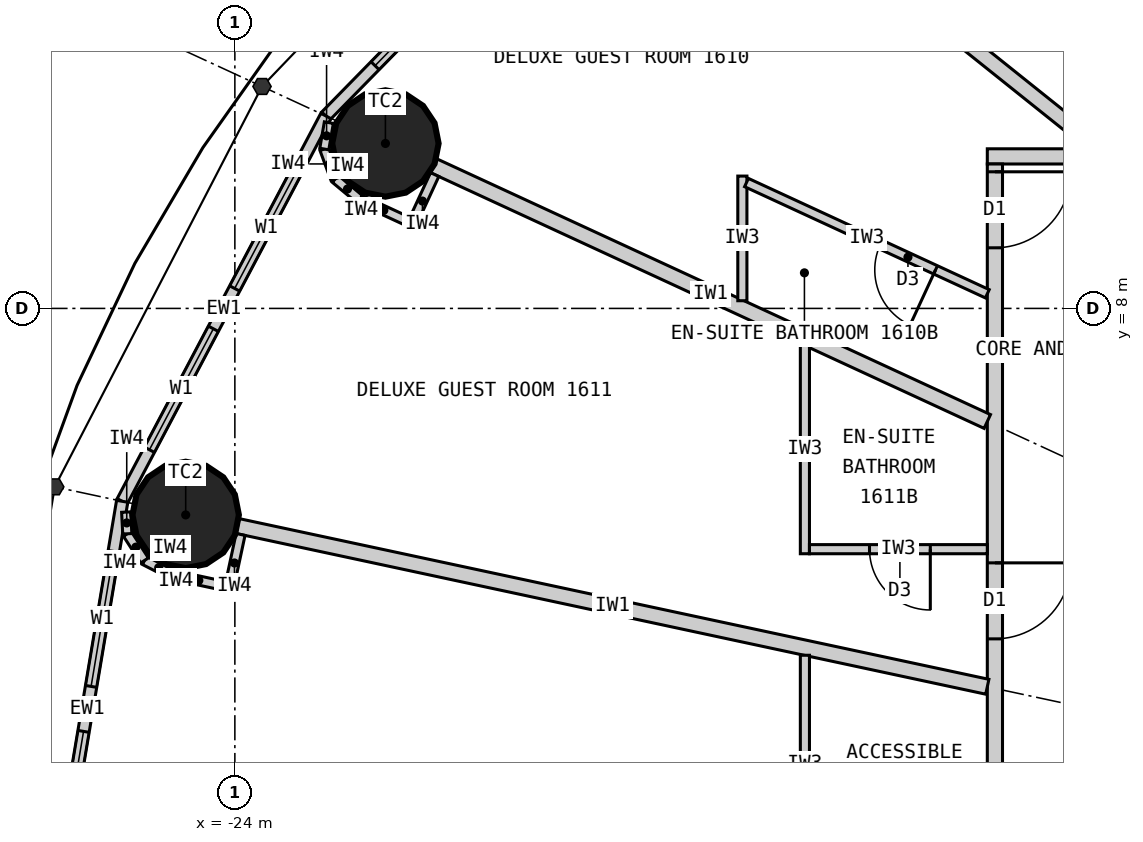
"""IFC4 building model, lengths in metres.
Left out: names, types, materials, properties, quantities, classifications, styles, units other than length and angle.
Written with IfcOpenShell. Run it as: python <this file> out.ifc"""

import sys

from ifc_helpers import new_model, si_unit, direction, frame, frame_2d, origin, origin_2d, place, context, subcontext, project, spatial, rectangle, circle, extrude, element, fill, save


model = new_model("IFC4")
c1 = context("Model", 3, precision=1e-05, world=origin(), true_north=direction((0.0, 1.0)))
c2 = subcontext(c1, "Body", "Model", "MODEL_VIEW")
j1 = project(units=[si_unit("LENGTHUNIT", "METRE"), si_unit("PLANEANGLEUNIT", "RADIAN")], contexts=[c1])
p1 = place(None, origin())
s1 = spatial("IfcSite", under=j1, at=p1, CompositionType="ELEMENT")
p2 = place(p1, origin())
s2 = spatial("IfcBuilding", under=s1, at=p2, CompositionType="ELEMENT")
p3 = place(p2, frame((0.0, 0.0, 67.2)))
s3 = spatial("IfcBuildingStorey", under=s2, at=p3, CompositionType="ELEMENT", Elevation=67.2)
for number, where, z_axis, x_axis in (
    (1, (-22.019, 10.17, 0.0), (0.0, 0.0, 1.0), (1.0, 0.0, 0.0)),
    (2, (-24.647, 5.283, 0.0), (0.0, 0.0, 1.0), (1.0, 0.0, 0.0)),
):
    element("IfcColumn", number, at=place(p3, frame(where, z_axis=z_axis, x_axis=x_axis)), inside=s3, PredefinedType="COLUMN", context=c2, shape_type="SweptSolid", body=[
        extrude(circle(Radius=0.7, at=origin_2d()), origin(), (0.0, 0.0, 1.0), 3.3),
    ])
p4 = place(p3, frame((-18.57, 14.856, 0.0), z_axis=(0.0, 0.0, 1.0), x_axis=(-0.699602905915, -0.714531856557, 0.0)))
e3 = element("IfcWall", 3, at=p4, inside=s3, PredefinedType="ELEMENTEDWALL", context=c2, shape_type="SweptSolid", body=[
    extrude(rectangle(XDim=6.051, YDim=0.15, at=frame_2d((3.025, 0.0))), origin(), (0.0, 0.0, 1.0), 3.12),
])
p5 = place(p4, frame((0.926, 0.0, 0.9)))
e4 = element("IfcOpeningElement", 4, at=p5, cuts=e3, PredefinedType="OPENING", context=c2, shape_type="SweptSolid", body=[
    extrude(rectangle(XDim=1.8, YDim=1.9, at=frame_2d((0.9, 0.95))), frame((0.0, 0.085, 0.0), z_axis=(0.0, -1.0, 0.0), x_axis=(1.0, 0.0, 0.0)), (0.0, 0.0, 1.0), 0.17),
])
p6 = place(p4, frame((3.325, 0.0, 0.9)))
e5 = element("IfcOpeningElement", 5, at=p6, cuts=e3, PredefinedType="OPENING", context=c2, shape_type="SweptSolid", body=[
    extrude(rectangle(XDim=1.8, YDim=1.9, at=frame_2d((0.9, 0.95))), frame((0.0, 0.085, 0.0), z_axis=(0.0, -1.0, 0.0), x_axis=(1.0, 0.0, 0.0)), (0.0, 0.0, 1.0), 0.17),
])
p7 = place(p3, frame((-22.803, 10.532, 0.0), z_axis=(0.0, 0.0, 1.0), x_axis=(-0.467296867008, -0.884100468321, 0.0)))
e6 = element("IfcWall", 6, at=p7, inside=s3, PredefinedType="ELEMENTEDWALL", context=c2, shape_type="SweptSolid", body=[
    extrude(rectangle(XDim=5.734, YDim=0.15, at=frame_2d((2.867, 0.0))), origin(), (0.0, 0.0, 1.0), 3.12),
])
p8 = place(p7, frame((0.767, 0.0, 0.9)))
e7 = element("IfcOpeningElement", 7, at=p8, cuts=e6, PredefinedType="OPENING", context=c2, shape_type="SweptSolid", body=[
    extrude(rectangle(XDim=1.8, YDim=1.9, at=frame_2d((0.9, 0.95))), frame((0.0, 0.085, 0.0), z_axis=(0.0, -1.0, 0.0), x_axis=(1.0, 0.0, 0.0)), (0.0, 0.0, 1.0), 0.17),
])
p9 = place(p7, frame((3.167, 0.0, 0.9)))
e8 = element("IfcOpeningElement", 8, at=p9, cuts=e6, PredefinedType="OPENING", context=c2, shape_type="SweptSolid", body=[
    extrude(rectangle(XDim=1.8, YDim=1.9, at=frame_2d((0.9, 0.95))), frame((0.0, 0.085, 0.0), z_axis=(0.0, -1.0, 0.0), x_axis=(1.0, 0.0, 0.0)), (0.0, 0.0, 1.0), 0.17),
])
p10 = place(p3, frame((-25.482, 5.462, 0.0), z_axis=(0.0, 0.0, 1.0), x_axis=(-0.165642551694, -0.986185857264, 0.0)))
e9 = element("IfcWall", 9, at=p10, inside=s3, PredefinedType="ELEMENTEDWALL", context=c2, shape_type="SweptSolid", body=[
    extrude(rectangle(XDim=5.539, YDim=0.15, at=frame_2d((2.77, 0.0))), origin(), (0.0, 0.0, 1.0), 3.12),
])
p11 = place(p10, frame((0.669, 0.0, 0.9)))
e10 = element("IfcOpeningElement", 10, at=p11, cuts=e9, PredefinedType="OPENING", context=c2, shape_type="SweptSolid", body=[
    extrude(rectangle(XDim=1.8, YDim=1.9, at=frame_2d((0.9, 0.95))), frame((0.0, 0.085, 0.0), z_axis=(0.0, -1.0, 0.0), x_axis=(1.0, 0.0, 0.0)), (0.0, 0.0, 1.0), 0.17),
])
p12 = place(p10, frame((3.07, 0.0, 0.9)))
e11 = element("IfcOpeningElement", 11, at=p12, cuts=e9, PredefinedType="OPENING", context=c2, shape_type="SweptSolid", body=[
    extrude(rectangle(XDim=1.8, YDim=1.9, at=frame_2d((0.9, 0.95))), frame((0.0, 0.085, 0.0), z_axis=(0.0, -1.0, 0.0), x_axis=(1.0, 0.0, 0.0)), (0.0, 0.0, 1.0), 0.17),
])
p13 = place(p3, frame((-14.1, 10.0, 0.0), z_axis=(0.0, 0.0, 1.0), x_axis=(1.0, 0.0, 0.0)))
e12 = element("IfcWall", 12, at=p13, inside=s3, PredefinedType="PARTITIONING", context=c2, shape_type="SweptSolid", body=[
    extrude(rectangle(XDim=28.2, YDim=0.2, at=frame_2d((14.1, 0.0))), origin(), (0.0, 0.0, 1.0), 3.12),
])
p14 = place(p13, frame((18.529, 0.0, 0.0)))
e13 = element("IfcOpeningElement", 13, at=p14, cuts=e12, PredefinedType="OPENING", context=c2, shape_type="SweptSolid", body=[
    extrude(rectangle(XDim=1.0, YDim=2.2, at=frame_2d((0.5, 1.1))), frame((0.0, 0.11, 0.0), z_axis=(0.0, -1.0, 0.0), x_axis=(1.0, 0.0, 0.0)), (0.0, 0.0, 1.0), 0.22),
])
p15 = place(p13, frame((14.623, 0.0, 0.0)))
e14 = element("IfcOpeningElement", 14, at=p15, cuts=e12, PredefinedType="OPENING", context=c2, shape_type="SweptSolid", body=[
    extrude(rectangle(XDim=1.0, YDim=2.2, at=frame_2d((0.5, 1.1))), frame((0.0, 0.11, 0.0), z_axis=(0.0, -1.0, 0.0), x_axis=(1.0, 0.0, 0.0)), (0.0, 0.0, 1.0), 0.22),
])
p16 = place(p13, frame((11.24, 0.0, 0.0)))
e15 = element("IfcOpeningElement", 15, at=p16, cuts=e12, PredefinedType="OPENING", context=c2, shape_type="SweptSolid", body=[
    extrude(rectangle(XDim=1.0, YDim=2.2, at=frame_2d((0.5, 1.1))), frame((0.0, 0.11, 0.0), z_axis=(0.0, -1.0, 0.0), x_axis=(1.0, 0.0, 0.0)), (0.0, 0.0, 1.0), 0.22),
])
p17 = place(p13, frame((8.671, 0.0, 0.0)))
e16 = element("IfcOpeningElement", 16, at=p17, cuts=e12, PredefinedType="OPENING", context=c2, shape_type="SweptSolid", body=[
    extrude(rectangle(XDim=1.0, YDim=2.2, at=frame_2d((0.5, 1.1))), frame((0.0, 0.11, 0.0), z_axis=(0.0, -1.0, 0.0), x_axis=(1.0, 0.0, 0.0)), (0.0, 0.0, 1.0), 0.22),
])
p18 = place(p13, frame((2.801, 0.0, 0.0)))
e17 = element("IfcOpeningElement", 17, at=p18, cuts=e12, PredefinedType="OPENING", context=c2, shape_type="SweptSolid", body=[
    extrude(rectangle(XDim=1.0, YDim=2.2, at=frame_2d((0.5, 1.1))), frame((0.0, 0.11, 0.0), z_axis=(0.0, -1.0, 0.0), x_axis=(1.0, 0.0, 0.0)), (0.0, 0.0, 1.0), 0.22),
])
p19 = place(p3, frame((-14.0, 9.9, 0.0), z_axis=(0.0, 0.0, 1.0), x_axis=(0.0, -1.0, 0.0)))
e18 = element("IfcWall", 18, at=p19, inside=s3, PredefinedType="PARTITIONING", context=c2, shape_type="SweptSolid", body=[
    extrude(rectangle(XDim=19.8, YDim=0.2, at=frame_2d((9.9, 0.0))), origin(), (0.0, 0.0, 1.0), 3.12),
])
p20 = place(p19, frame((0.103, 0.0, 0.0)))
e19 = element("IfcOpeningElement", 19, at=p20, cuts=e18, PredefinedType="OPENING", context=c2, shape_type="SweptSolid", body=[
    extrude(rectangle(XDim=1.0, YDim=2.2, at=frame_2d((0.5, 1.1))), frame((0.0, 0.11, 0.0), z_axis=(0.0, -1.0, 0.0), x_axis=(1.0, 0.0, 0.0)), (0.0, 0.0, 1.0), 0.22),
])
p21 = place(p19, frame((5.248, 0.0, 0.0)))
e20 = element("IfcOpeningElement", 20, at=p21, cuts=e18, PredefinedType="OPENING", context=c2, shape_type="SweptSolid", body=[
    extrude(rectangle(XDim=1.0, YDim=2.2, at=frame_2d((0.5, 1.1))), frame((0.0, 0.11, 0.0), z_axis=(0.0, -1.0, 0.0), x_axis=(1.0, 0.0, 0.0)), (0.0, 0.0, 1.0), 0.22),
])
p22 = place(p19, frame((9.438, 0.0, 0.0)))
e21 = element("IfcOpeningElement", 21, at=p22, cuts=e18, PredefinedType="OPENING", context=c2, shape_type="SweptSolid", body=[
    extrude(rectangle(XDim=1.0, YDim=2.2, at=frame_2d((0.5, 1.1))), frame((0.0, 0.11, 0.0), z_axis=(0.0, -1.0, 0.0), x_axis=(1.0, 0.0, 0.0)), (0.0, 0.0, 1.0), 0.22),
])
p23 = place(p19, frame((13.942, 0.0, 0.0)))
e22 = element("IfcOpeningElement", 22, at=p23, cuts=e18, PredefinedType="OPENING", context=c2, shape_type="SweptSolid", body=[
    extrude(rectangle(XDim=1.0, YDim=2.2, at=frame_2d((0.5, 1.1))), frame((0.0, 0.11, 0.0), z_axis=(0.0, -1.0, 0.0), x_axis=(1.0, 0.0, 0.0)), (0.0, 0.0, 1.0), 0.22),
])
p24 = place(p19, frame((18.698, 0.0, 0.0)))
e23 = element("IfcOpeningElement", 23, at=p24, cuts=e18, PredefinedType="OPENING", context=c2, shape_type="SweptSolid", body=[
    extrude(rectangle(XDim=1.0, YDim=2.2, at=frame_2d((0.5, 1.1))), frame((0.0, 0.11, 0.0), z_axis=(0.0, -1.0, 0.0), x_axis=(1.0, 0.0, 0.0)), (0.0, 0.0, 1.0), 0.22),
])
p25 = place(p3, frame((-12.625, 10.1, 0.0), z_axis=(0.0, 0.0, 1.0), x_axis=(-0.780892451574, 0.624665493744, 0.0)))
e24 = element("IfcWall", 24, at=p25, inside=s3, PredefinedType="PARTITIONING", context=c2, shape_type="SweptSolid", body=[
    extrude(rectangle(XDim=6.045, YDim=0.2, at=frame_2d((3.022, 0.0))), origin(), (0.0, 0.0, 1.0), 2.32),
])
p26 = place(p3, frame((-14.1, 6.512, 0.0), z_axis=(0.0, 0.0, 1.0), x_axis=(-0.907832871056, 0.419332181247, 0.0)))
e25 = element("IfcWall", 25, at=p26, inside=s3, PredefinedType="PARTITIONING", context=c2, shape_type="SweptSolid", body=[
    extrude(rectangle(XDim=8.023, YDim=0.2, at=frame_2d((4.011, 0.0))), origin(), (0.0, 0.0, 1.0), 2.32),
])
p27 = place(p3, frame((-14.1, 3.022, 0.0), z_axis=(0.0, 0.0, 1.0), x_axis=(-0.977790014929, 0.209586943072, 0.0)))
e26 = element("IfcWall", 26, at=p27, inside=s3, PredefinedType="PARTITIONING", context=c2, shape_type="SweptSolid", body=[
    extrude(rectangle(XDim=10.087, YDim=0.2, at=frame_2d((5.043, 0.0))), origin(), (0.0, 0.0, 1.0), 2.32),
])
p28 = place(p3, frame((-17.323, 8.101, 0.0), z_axis=(0.0, 0.0, 1.0), x_axis=(0.0, 1.0, 0.0)))
e27 = element("IfcWall", 27, at=p28, inside=s3, PredefinedType="PARTITIONING", context=c2, shape_type="SweptSolid", body=[
    extrude(rectangle(XDim=1.64, YDim=0.12, at=frame_2d((0.82, 0.0))), origin(), (0.0, 0.0, 1.0), 3.12),
])
p29 = place(p3, frame((-14.1, 8.193, 0.0), z_axis=(0.0, 0.0, 1.0), x_axis=(-0.907836493557, 0.419324338628, 0.0)))
e28 = element("IfcWall", 28, at=p29, inside=s3, PredefinedType="PARTITIONING", context=c2, shape_type="SweptSolid", body=[
    extrude(rectangle(XDim=3.49, YDim=0.12, at=frame_2d((1.745, 0.0))), origin(), (0.0, 0.0, 1.0), 3.12),
])
p30 = place(p29, frame((0.75, 0.0, 0.0)))
e29 = element("IfcOpeningElement", 29, at=p30, cuts=e28, PredefinedType="OPENING", context=c2, shape_type="SweptSolid", body=[
    extrude(rectangle(XDim=0.8, YDim=2.1, at=frame_2d((0.4, 1.05))), frame((0.0, 0.07, 0.0), z_axis=(0.0, -1.0, 0.0), x_axis=(1.0, 0.0, 0.0)), (0.0, 0.0, 1.0), 0.14),
])
p31 = place(p3, frame((-16.5, 7.521, 0.0), z_axis=(0.0, 0.0, 1.0), x_axis=(0.0, -1.0, 0.0)))
e30 = element("IfcWall", 30, at=p31, inside=s3, PredefinedType="PARTITIONING", context=c2, shape_type="SweptSolid", body=[
    extrude(rectangle(XDim=2.749, YDim=0.12, at=frame_2d((1.374, 0.0))), origin(), (0.0, 0.0, 1.0), 3.12),
])
p32 = place(p3, frame((-14.1, 4.833, 0.0), z_axis=(0.0, 0.0, 1.0), x_axis=(-1.0, 0.0, 0.0)))
e31 = element("IfcWall", 31, at=p32, inside=s3, PredefinedType="PARTITIONING", context=c2, shape_type="SweptSolid", body=[
    extrude(rectangle(XDim=2.34, YDim=0.12, at=frame_2d((1.17, 0.0))), origin(), (0.0, 0.0, 1.0), 3.12),
])
p33 = place(p32, frame((0.75, 0.0, 0.0)))
e32 = element("IfcOpeningElement", 32, at=p33, cuts=e31, PredefinedType="OPENING", context=c2, shape_type="SweptSolid", body=[
    extrude(rectangle(XDim=0.8, YDim=2.1, at=frame_2d((0.4, 1.05))), frame((0.0, 0.07, 0.0), z_axis=(0.0, -1.0, 0.0), x_axis=(1.0, 0.0, 0.0)), (0.0, 0.0, 1.0), 0.14),
])
p34 = place(p3, frame((-16.5, 3.437, 0.0), z_axis=(0.0, 0.0, 1.0), x_axis=(0.0, -1.0, 0.0)))
e33 = element("IfcWall", 33, at=p34, inside=s3, PredefinedType="PARTITIONING", context=c2, shape_type="SweptSolid", body=[
    extrude(rectangle(XDim=2.854, YDim=0.12, at=frame_2d((1.427, 0.0))), origin(), (0.0, 0.0, 1.0), 3.12),
])
p35 = place(p3, frame((-21.371, 9.761, 0.0), z_axis=(0.0, 0.0, 1.0), x_axis=(-0.419259891039, -0.907866258744, 0.0)))
e34 = element("IfcWall", 34, at=p35, inside=s3, PredefinedType="PARTITIONING", context=c2, shape_type="SweptSolid", body=[
    extrude(rectangle(XDim=0.768, YDim=0.12, at=frame_2d((0.384, 0.0))), origin(), (0.0, 0.0, 1.0), 3.12),
])
p36 = place(p3, frame((-21.722, 9.144, 0.0), z_axis=(0.0, 0.0, 1.0), x_axis=(-0.907877701396, 0.419235112208, 0.0)))
e35 = element("IfcWall", 35, at=p36, inside=s3, PredefinedType="PARTITIONING", context=c2, shape_type="SweptSolid", body=[
    extrude(rectangle(XDim=0.7, YDim=0.12, at=frame_2d((0.35, 0.0))), origin(), (0.0, 0.0, 1.0), 3.12),
])
p37 = place(p3, frame((-22.358, 9.437, 0.0), z_axis=(0.0, 0.0, 1.0), x_axis=(-0.768412687942, 0.639954639806, 0.0)))
e36 = element("IfcWall", 36, at=p37, inside=s3, PredefinedType="PARTITIONING", context=c2, shape_type="SweptSolid", body=[
    extrude(rectangle(XDim=0.418, YDim=0.12, at=frame_2d((0.209, 0.0))), origin(), (0.0, 0.0, 1.0), 3.12),
])
p38 = place(p3, frame((-22.679, 9.705, 0.0), z_axis=(0.0, 0.0, 1.0), x_axis=(-0.345164001646, 0.938542386879, 0.0)))
e37 = element("IfcWall", 37, at=p38, inside=s3, PredefinedType="PARTITIONING", context=c2, shape_type="SweptSolid", body=[
    extrude(rectangle(XDim=0.418, YDim=0.12, at=frame_2d((0.209, 0.0))), origin(), (0.0, 0.0, 1.0), 3.12),
])
p39 = place(p3, frame((-22.823, 10.097, 0.0), z_axis=(0.0, 0.0, 1.0), x_axis=(0.169674995186, 0.985500074079, 0.0)))
e38 = element("IfcWall", 38, at=p39, inside=s3, PredefinedType="PARTITIONING", context=c2, shape_type="SweptSolid", body=[
    extrude(rectangle(XDim=0.353, YDim=0.12, at=frame_2d((0.176, 0.0))), origin(), (0.0, 0.0, 1.0), 3.12),
])
p40 = place(p3, frame((-23.925, 5.026, 0.0), z_axis=(0.0, 0.0, 1.0), x_axis=(-0.209681192172, -0.977769808109, 0.0)))
e39 = element("IfcWall", 39, at=p40, inside=s3, PredefinedType="PARTITIONING", context=c2, shape_type="SweptSolid", body=[
    extrude(rectangle(XDim=0.767, YDim=0.12, at=frame_2d((0.384, 0.0))), origin(), (0.0, 0.0, 1.0), 3.12),
])
p41 = place(p3, frame((-24.132, 4.347, 0.0), z_axis=(0.0, 0.0, 1.0), x_axis=(-0.977776882509, 0.209648200638, 0.0)))
e40 = element("IfcWall", 40, at=p41, inside=s3, PredefinedType="PARTITIONING", context=c2, shape_type="SweptSolid", body=[
    extrude(rectangle(XDim=0.7, YDim=0.12, at=frame_2d((0.35, 0.0))), origin(), (0.0, 0.0, 1.0), 3.12),
])
for number, where, z_axis, x_axis in (
    (41, (-24.816, 4.494, 0.0), (0.0, 0.0, 1.0), (-0.89, 0.455, 0.0)),
    (42, (-25.188, 4.684, 0.0), (0.0, 0.0, 1.0), (-0.543, 0.84, 0.0)),
):
    element("IfcWall", number, at=place(p3, frame(where, z_axis=z_axis, x_axis=x_axis)), inside=s3, PredefinedType="PARTITIONING", context=c2, shape_type="SweptSolid", body=[
        extrude(rectangle(XDim=0.418, YDim=0.12, at=frame_2d((0.209, 0.0))), origin(), (0.0, 0.0, 1.0), 3.12),
    ])
p42 = place(p3, frame((-25.416, 5.035, 0.0), z_axis=(0.0, 0.0, 1.0), x_axis=(-0.050406329159, 0.998728793007, 0.0)))
e43 = element("IfcWall", 43, at=p42, inside=s3, PredefinedType="PARTITIONING", context=c2, shape_type="SweptSolid", body=[
    extrude(rectangle(XDim=0.286, YDim=0.12, at=frame_2d((0.143, 0.0))), origin(), (0.0, 0.0, 1.0), 3.12),
])
p43 = place(p6, origin())
e44 = element("IfcWindow", 44, at=p43, inside=s3, PartitioningType="SINGLE_PANEL", PredefinedType="WINDOW", context=c2, shape_type="SweptSolid", body=[
    extrude(rectangle(XDim=1.8, YDim=1.9, at=frame_2d((0.9, 0.95))), frame((0.0, 0.03, 0.0), z_axis=(0.0, -1.0, 0.0), x_axis=(1.0, 0.0, 0.0)), (0.0, 0.0, 1.0), 0.06),
])
fill(e5, e44)
p44 = place(p8, origin())
e45 = element("IfcWindow", 45, at=p44, inside=s3, PartitioningType="SINGLE_PANEL", PredefinedType="WINDOW", context=c2, shape_type="SweptSolid", body=[
    extrude(rectangle(XDim=1.8, YDim=1.9, at=frame_2d((0.9, 0.95))), frame((0.0, 0.03, 0.0), z_axis=(0.0, -1.0, 0.0), x_axis=(1.0, 0.0, 0.0)), (0.0, 0.0, 1.0), 0.06),
])
fill(e7, e45)
p45 = place(p9, origin())
e46 = element("IfcWindow", 46, at=p45, inside=s3, PartitioningType="SINGLE_PANEL", PredefinedType="WINDOW", context=c2, shape_type="SweptSolid", body=[
    extrude(rectangle(XDim=1.8, YDim=1.9, at=frame_2d((0.9, 0.95))), frame((0.0, 0.03, 0.0), z_axis=(0.0, -1.0, 0.0), x_axis=(1.0, 0.0, 0.0)), (0.0, 0.0, 1.0), 0.06),
])
fill(e8, e46)
p46 = place(p11, origin())
e47 = element("IfcWindow", 47, at=p46, inside=s3, PartitioningType="SINGLE_PANEL", PredefinedType="WINDOW", context=c2, shape_type="SweptSolid", body=[
    extrude(rectangle(XDim=1.8, YDim=1.9, at=frame_2d((0.9, 0.95))), frame((0.0, 0.03, 0.0), z_axis=(0.0, -1.0, 0.0), x_axis=(1.0, 0.0, 0.0)), (0.0, 0.0, 1.0), 0.06),
])
fill(e10, e47)
p47 = place(p12, origin())
e48 = element("IfcWindow", 48, at=p47, inside=s3, PartitioningType="SINGLE_PANEL", PredefinedType="WINDOW", context=c2, shape_type="SweptSolid", body=[
    extrude(rectangle(XDim=1.8, YDim=1.9, at=frame_2d((0.9, 0.95))), frame((0.0, 0.03, 0.0), z_axis=(0.0, -1.0, 0.0), x_axis=(1.0, 0.0, 0.0)), (0.0, 0.0, 1.0), 0.06),
])
fill(e11, e48)
p48 = place(p30, origin())
e49 = element("IfcDoor", 49, at=p48, inside=s3, OperationType="SINGLE_SWING_LEFT", PredefinedType="DOOR", context=c2, shape_type="SweptSolid", body=[
    extrude(rectangle(XDim=0.8, YDim=2.1, at=frame_2d((0.4, 1.05))), frame((0.0, 0.025, 0.0), z_axis=(0.0, -1.0, 0.0), x_axis=(1.0, 0.0, 0.0)), (0.0, 0.0, 1.0), 0.05),
])
fill(e29, e49)
p49 = place(p20, origin())
e50 = element("IfcDoor", 50, at=p49, inside=s3, OperationType="SINGLE_SWING_LEFT", PredefinedType="DOOR", context=c2, shape_type="SweptSolid", body=[
    extrude(rectangle(XDim=1.0, YDim=2.2, at=frame_2d((0.5, 1.1))), frame((0.0, 0.025, 0.0), z_axis=(0.0, -1.0, 0.0), x_axis=(1.0, 0.0, 0.0)), (0.0, 0.0, 1.0), 0.05),
])
fill(e19, e50)
p50 = place(p33, origin())
e51 = element("IfcDoor", 51, at=p50, inside=s3, OperationType="SINGLE_SWING_LEFT", PredefinedType="DOOR", context=c2, shape_type="SweptSolid", body=[
    extrude(rectangle(XDim=0.8, YDim=2.1, at=frame_2d((0.4, 1.05))), frame((0.0, 0.025, 0.0), z_axis=(0.0, -1.0, 0.0), x_axis=(1.0, 0.0, 0.0)), (0.0, 0.0, 1.0), 0.05),
])
fill(e32, e51)
p51 = place(p21, origin())
e52 = element("IfcDoor", 52, at=p51, inside=s3, OperationType="SINGLE_SWING_LEFT", PredefinedType="DOOR", context=c2, shape_type="SweptSolid", body=[
    extrude(rectangle(XDim=1.0, YDim=2.2, at=frame_2d((0.5, 1.1))), frame((0.0, 0.025, 0.0), z_axis=(0.0, -1.0, 0.0), x_axis=(1.0, 0.0, 0.0)), (0.0, 0.0, 1.0), 0.05),
])
fill(e20, e52)
save(model, sys.argv[1])
